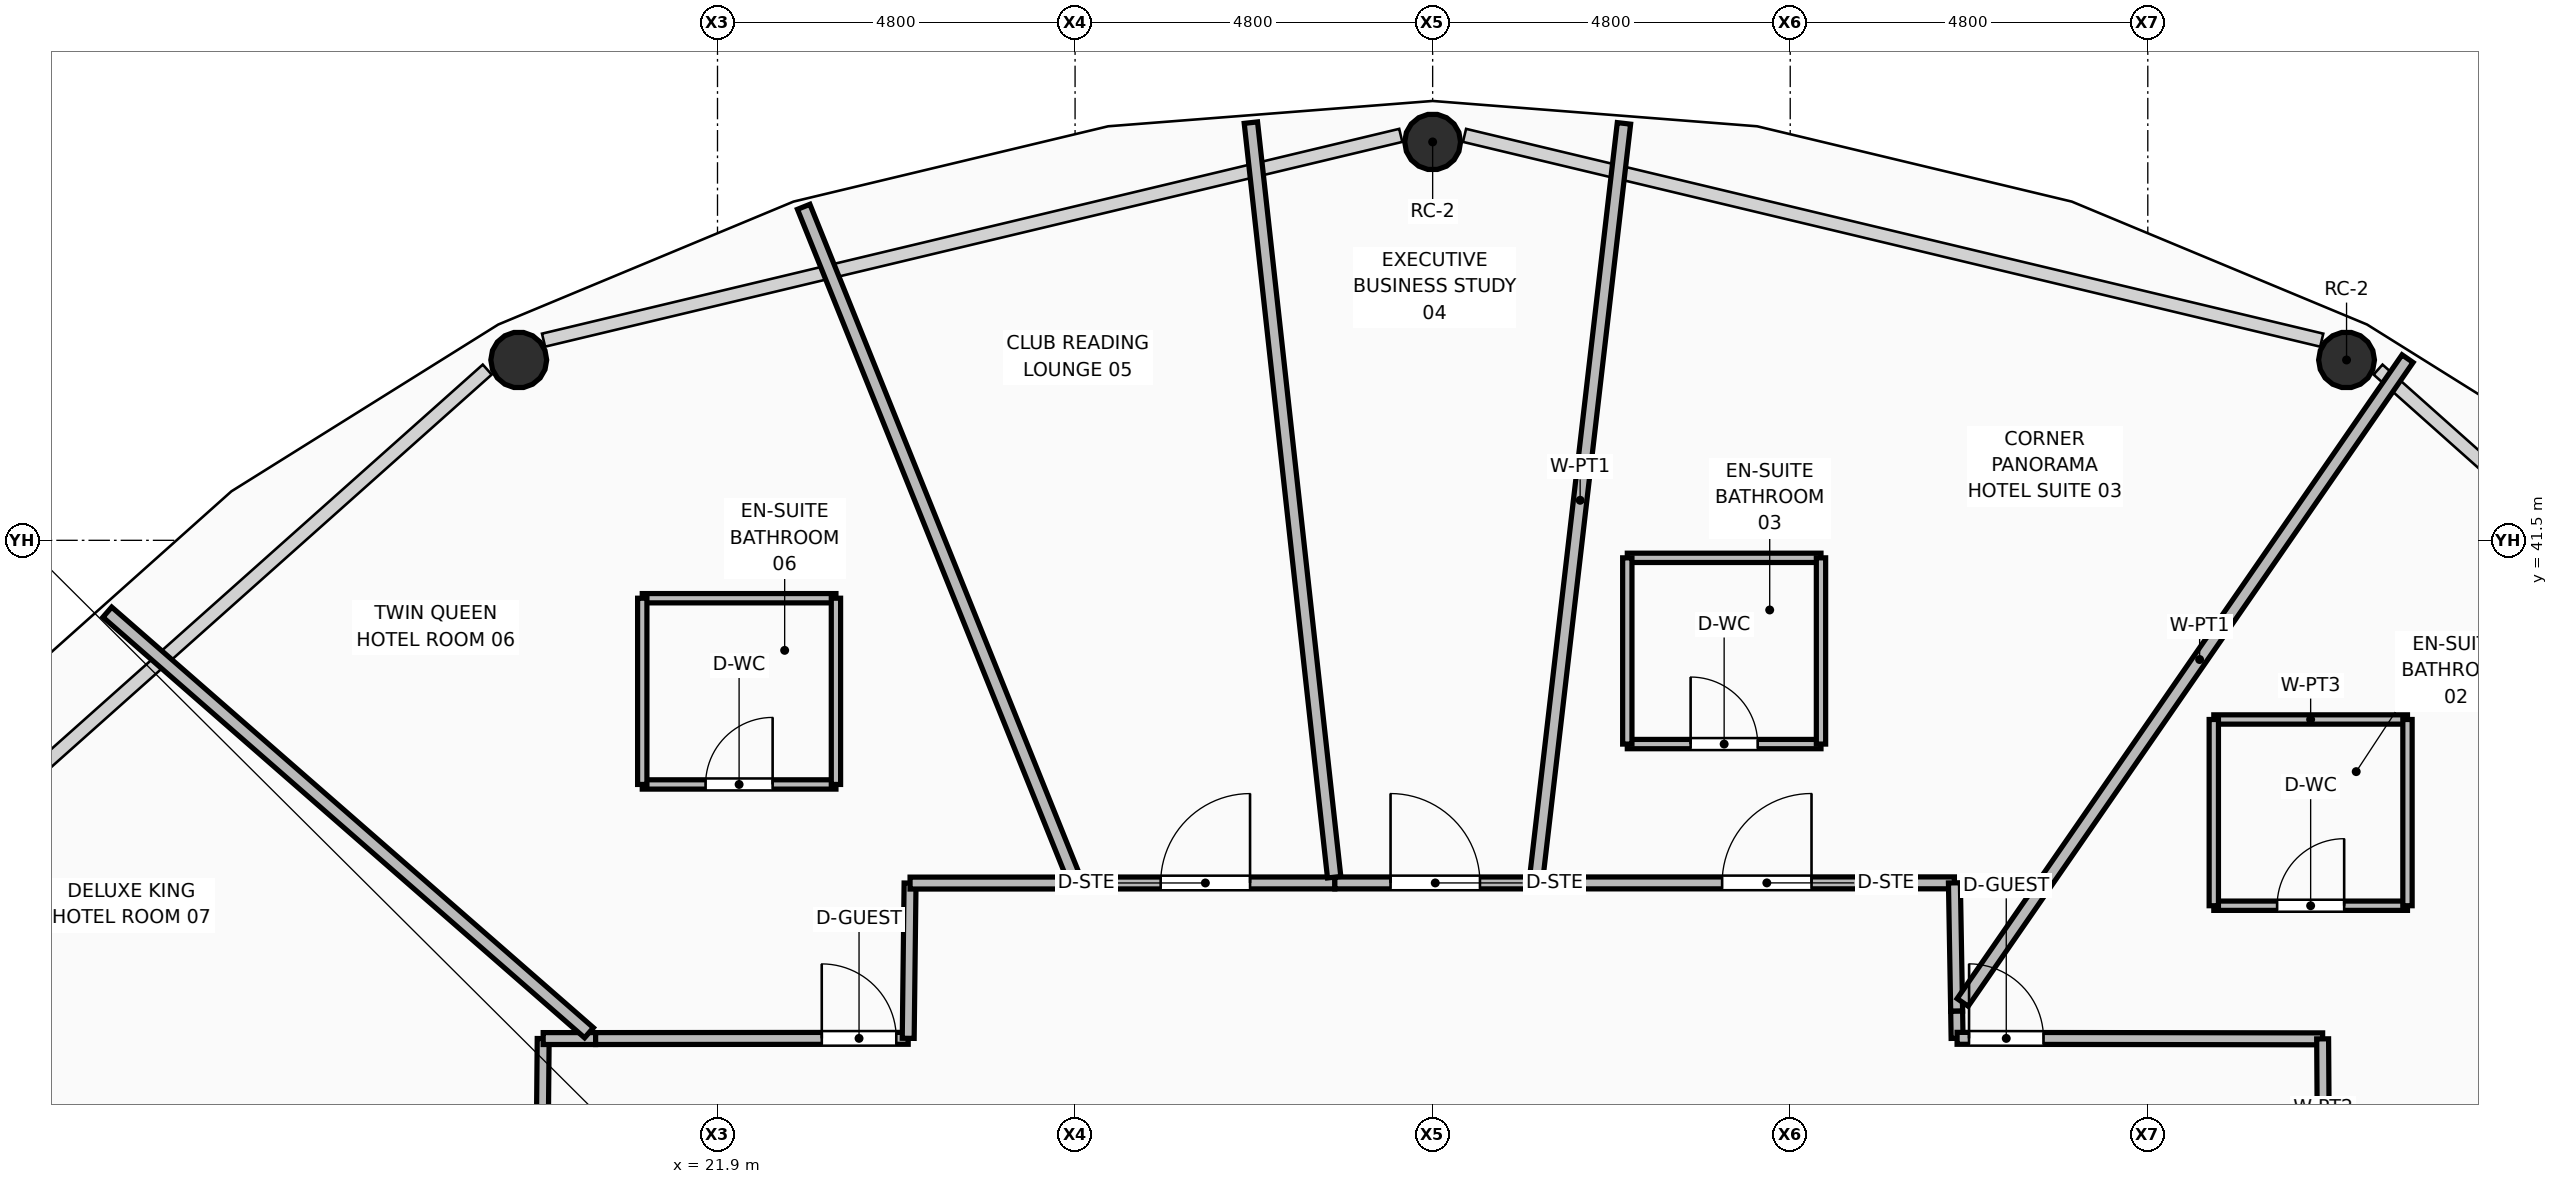
"""IFC4 building model, lengths in metres.
Left out: names, types, materials, properties, quantities, classifications, styles, units other than length and angle.
Written with IfcOpenShell. Run it as: python <this file> out.ifc"""

import sys

from ifc_helpers import new_model, si_unit, direction, frame, frame_2d, origin, origin_2d, place, context, subcontext, project, spatial, rectangle, hollow_circle, extrude, element, fill, save


model = new_model("IFC4")
c1 = context("Model", 3, precision=1e-05, world=origin(), true_north=direction((0.0, 1.0)))
c2 = subcontext(c1, "Body", "Model", "MODEL_VIEW")
j1 = project(units=[si_unit("LENGTHUNIT", "METRE"), si_unit("PLANEANGLEUNIT", "RADIAN")], contexts=[c1])
p1 = place(None, origin())
s1 = spatial("IfcSite", under=j1, at=p1, CompositionType="ELEMENT")
p2 = place(p1, origin())
s2 = spatial("IfcBuilding", under=s1, at=p2, CompositionType="ELEMENT")
p3 = place(p2, frame((0.0, 0.0, 172.2)))
s3 = spatial("IfcBuildingStorey", under=s2, at=p3, CompositionType="ELEMENT", Elevation=172.2)
p4 = place(p3, frame((43.768, 43.921, 0.0), z_axis=(-0.0265446917, -0.041036281919, 0.998804987427), x_axis=(0.839646641546, -0.543133056756, 0.0)))
e1 = element("IfcColumn", 1, at=p4, inside=s3, PredefinedType="COLUMN", context=c2, shape_type="SweptSolid", body=[
    extrude(hollow_circle(Radius=0.375, WallThickness=0.035, at=origin_2d()), origin(), (0.0, 0.0, 1.0), 3.504),
])
p5 = place(p3, frame((31.5, 46.848, 0.0), z_axis=(0.0, -0.047379765961, 0.998876948266), x_axis=(1.0, 0.0, 0.0)))
e2 = element("IfcColumn", 2, at=p5, inside=s3, PredefinedType="COLUMN", context=c2, shape_type="SweptSolid", body=[
    extrude(hollow_circle(Radius=0.375, WallThickness=0.035, at=origin_2d()), origin(), (0.0, 0.0, 1.0), 3.504),
])
p6 = place(p3, frame((19.232, 43.921, 0.0), z_axis=(0.0265446917, -0.041036281919, 0.998804987427), x_axis=(0.839646641546, 0.543133056756, 0.0)))
e3 = element("IfcColumn", 3, at=p6, inside=s3, PredefinedType="COLUMN", context=c2, shape_type="SweptSolid", body=[
    extrude(hollow_circle(Radius=0.375, WallThickness=0.035, at=origin_2d()), origin(), (0.0, 0.0, 1.0), 3.504),
])
p7 = place(p3, frame((19.535, 32.04, 0.0), z_axis=(0.0, 0.0, 1.0), x_axis=(0.009071319538, 0.999958854734, 0.0)))
e4 = element("IfcWall", 4, at=p7, inside=s3, PredefinedType="PARTITIONING", context=c2, shape_type="SweptSolid", body=[
    extrude(rectangle(XDim=2.772, YDim=0.16, at=frame_2d((1.386, 0.0))), origin(), (0.0, 0.0, 1.0), 2.936),
])
p8 = place(p3, frame((19.56, 34.812, 0.0), z_axis=(0.0, 0.0, 1.0), x_axis=(1.0, 0.0, 0.0)))
e5 = element("IfcWall", 5, at=p8, inside=s3, PredefinedType="PARTITIONING", context=c2, shape_type="SweptSolid", body=[
    extrude(rectangle(XDim=0.704, YDim=0.16, at=frame_2d((0.352, 0.0))), origin(), (0.0, 0.0, 1.0), 3.48),
])
p9 = place(p3, frame((20.264, 34.812, 0.0), z_axis=(0.0, 0.0, 1.0), x_axis=(0.999999756257, 0.000698201959, 0.0)))
e6 = element("IfcWall", 6, at=p9, inside=s3, PredefinedType="PARTITIONING", context=c2, shape_type="SweptSolid", body=[
    extrude(rectangle(XDim=4.196, YDim=0.16, at=frame_2d((2.098, 0.0))), origin(), (0.0, 0.0, 1.0), 2.936),
])
p10 = place(p9, frame((3.036, 0.0, 0.0)))
e7 = element("IfcOpeningElement", 7, at=p10, cuts=e6, PredefinedType="OPENING", context=c2, shape_type="SweptSolid", body=[
    extrude(rectangle(XDim=1.0, YDim=2.1, at=frame_2d((0.5, 1.05))), frame((0.0, 0.09, 0.0), z_axis=(0.0, -1.0, 0.0), x_axis=(1.0, 0.0, 0.0)), (0.0, 0.0, 1.0), 0.18),
])
p11 = place(p3, frame((24.46, 34.815, 0.0), z_axis=(0.0, 0.0, 1.0), x_axis=(0.012065663349, 0.999927207235, 0.0)))
e8 = element("IfcWall", 8, at=p11, inside=s3, PredefinedType="PARTITIONING", context=c2, shape_type="SweptSolid", body=[
    extrude(rectangle(XDim=2.084, YDim=0.16, at=frame_2d((1.042, 0.0))), origin(), (0.0, 0.0, 1.0), 3.48),
])
p12 = place(p3, frame((24.485, 36.899, 0.0), z_axis=(0.0, 0.0, 1.0), x_axis=(0.999999903669, 0.00043893335, 0.0)))
e9 = element("IfcWall", 9, at=p12, inside=s3, PredefinedType="PARTITIONING", context=c2, shape_type="SweptSolid", body=[
    extrude(rectangle(XDim=2.225, YDim=0.16, at=frame_2d((1.112, 0.0))), origin(), (0.0, 0.0, 1.0), 3.48),
])
p13 = place(p3, frame((26.71, 36.9, 0.0), z_axis=(0.0, 0.0, 1.0), x_axis=(0.999999960559, 0.000280859419, 0.0)))
e10 = element("IfcWall", 10, at=p13, inside=s3, PredefinedType="PARTITIONING", context=c2, shape_type="SweptSolid", body=[
    extrude(rectangle(XDim=3.477, YDim=0.16, at=frame_2d((1.739, 0.0))), origin(), (0.0, 0.0, 1.0), 3.48),
])
p14 = place(p13, frame((1.139, 0.0, 0.0)))
e11 = element("IfcOpeningElement", 11, at=p14, cuts=e10, PredefinedType="OPENING", context=c2, shape_type="SweptSolid", body=[
    extrude(rectangle(XDim=1.2, YDim=2.1, at=frame_2d((0.6, 1.05))), frame((0.0, 0.09, 0.0), z_axis=(0.0, -1.0, 0.0), x_axis=(1.0, 0.0, 0.0)), (0.0, 0.0, 1.0), 0.18),
])
p15 = place(p3, frame((30.187, 36.901, 0.0), z_axis=(0.0, 0.0, 1.0), x_axis=(1.0, 0.0, 0.0)))
e12 = element("IfcWall", 12, at=p15, inside=s3, PredefinedType="PARTITIONING", context=c2, shape_type="SweptSolid", body=[
    extrude(rectangle(XDim=2.696, YDim=0.16, at=frame_2d((1.348, 0.0))), origin(), (0.0, 0.0, 1.0), 2.936),
])
p16 = place(p15, frame((0.748, 0.0, 0.0)))
e13 = element("IfcOpeningElement", 13, at=p16, cuts=e12, PredefinedType="OPENING", context=c2, shape_type="SweptSolid", body=[
    extrude(rectangle(XDim=1.2, YDim=2.1, at=frame_2d((0.6, 1.05))), frame((0.0, 0.09, 0.0), z_axis=(0.0, -1.0, 0.0), x_axis=(1.0, 0.0, 0.0)), (0.0, 0.0, 1.0), 0.18),
])
p17 = place(p3, frame((32.883, 36.901, 0.0), z_axis=(0.0, 0.0, 1.0), x_axis=(0.999999976418, 0.000217174125, 0.0)))
e14 = element("IfcWall", 14, at=p17, inside=s3, PredefinedType="PARTITIONING", context=c2, shape_type="SweptSolid", body=[
    extrude(rectangle(XDim=5.621, YDim=0.16, at=frame_2d((2.811, 0.0))), origin(), (0.0, 0.0, 1.0), 3.48),
])
p18 = place(p17, frame((2.503, 0.0, 0.0)))
e15 = element("IfcOpeningElement", 15, at=p18, cuts=e14, PredefinedType="OPENING", context=c2, shape_type="SweptSolid", body=[
    extrude(rectangle(XDim=1.2, YDim=2.1, at=frame_2d((0.6, 1.05))), frame((0.0, 0.09, 0.0), z_axis=(0.0, -1.0, 0.0), x_axis=(1.0, 0.0, 0.0)), (0.0, 0.0, 1.0), 0.18),
])
p19 = place(p3, frame((38.504, 36.902, 0.0), z_axis=(0.0, 0.0, 1.0), x_axis=(0.017424387449, -0.999848183837, 0.0)))
e16 = element("IfcWall", 16, at=p19, inside=s3, PredefinedType="PARTITIONING", context=c2, shape_type="SweptSolid", body=[
    extrude(rectangle(XDim=1.723, YDim=0.16, at=frame_2d((0.862, 0.0))), origin(), (0.0, 0.0, 1.0), 3.48),
])
p20 = place(p3, frame((38.534, 35.179, 0.0), z_axis=(0.0, 0.0, 1.0), x_axis=(0.016764913799, -0.999859458957, 0.0)))
e17 = element("IfcWall", 17, at=p20, inside=s3, PredefinedType="PARTITIONING", context=c2, shape_type="SweptSolid", body=[
    extrude(rectangle(XDim=0.364, YDim=0.16, at=frame_2d((0.182, 0.0))), origin(), (0.0, 0.0, 1.0), 3.48),
])
p21 = place(p3, frame((38.54, 34.815, 0.0), z_axis=(0.0, 0.0, 1.0), x_axis=(0.999999029632, -0.001393102783, 0.0)))
e18 = element("IfcWall", 18, at=p21, inside=s3, PredefinedType="PARTITIONING", context=c2, shape_type="SweptSolid", body=[
    extrude(rectangle(XDim=4.907, YDim=0.16, at=frame_2d((2.454, 0.0))), origin(), (0.0, 0.0, 1.0), 2.936),
])
p22 = place(p21, frame((0.16, 0.0, 0.0)))
e19 = element("IfcOpeningElement", 19, at=p22, cuts=e18, PredefinedType="OPENING", context=c2, shape_type="SweptSolid", body=[
    extrude(rectangle(XDim=1.0, YDim=2.1, at=frame_2d((0.5, 1.05))), frame((0.0, 0.09, 0.0), z_axis=(0.0, -1.0, 0.0), x_axis=(1.0, 0.0, 0.0)), (0.0, 0.0, 1.0), 0.18),
])
p23 = place(p3, frame((43.447, 34.808, 0.0), z_axis=(0.0, 0.0, 1.0), x_axis=(0.006526585281, -0.999978701615, 0.0)))
e20 = element("IfcWall", 20, at=p23, inside=s3, PredefinedType="PARTITIONING", context=c2, shape_type="SweptSolid", body=[
    extrude(rectangle(XDim=2.768, YDim=0.16, at=frame_2d((1.384, 0.0))), origin(), (0.0, 0.0, 1.0), 2.936),
])
p24 = place(p3, frame((44.091, 32.115, 0.0), z_axis=(0.0, 0.0, 1.0), x_axis=(0.87061851124, 0.491958746122, 0.0)))
e21 = element("IfcWall", 21, at=p24, inside=s3, PredefinedType="PARTITIONING", context=c2, shape_type="SweptSolid", body=[
    extrude(rectangle(XDim=9.718, YDim=0.18, at=frame_2d((4.859, 0.0))), origin(), (0.0, 0.0, 1.0), 2.783),
])
p25 = place(p3, frame((38.615, 35.297, 0.0), z_axis=(0.0, 0.0, 1.0), x_axis=(0.568508810202, 0.822677174062, 0.0)))
e22 = element("IfcWall", 22, at=p25, inside=s3, PredefinedType="PARTITIONING", context=c2, shape_type="SweptSolid", body=[
    extrude(rectangle(XDim=10.505, YDim=0.18, at=frame_2d((5.252, 0.0))), origin(), (0.0, 0.0, 1.0), 2.783),
])
p26 = place(p3, frame((32.892, 36.978, 0.0), z_axis=(0.0, 0.0, 1.0), x_axis=(0.115443667248, 0.99331402874, 0.0)))
e23 = element("IfcWall", 23, at=p26, inside=s3, PredefinedType="PARTITIONING", context=c2, shape_type="SweptSolid", body=[
    extrude(rectangle(XDim=10.187, YDim=0.18, at=frame_2d((5.094, 0.0))), origin(), (0.0, 0.0, 1.0), 2.783),
])
p27 = place(p3, frame((30.178, 36.978, 0.0), z_axis=(0.0, 0.0, 1.0), x_axis=(-0.109703118526, 0.993964398651, 0.0)))
e24 = element("IfcWall", 24, at=p27, inside=s3, PredefinedType="PARTITIONING", context=c2, shape_type="SweptSolid", body=[
    extrude(rectangle(XDim=10.19, YDim=0.18, at=frame_2d((5.095, 0.0))), origin(), (0.0, 0.0, 1.0), 2.783),
])
p28 = place(p3, frame((26.679, 36.978, 0.0), z_axis=(0.0, 0.0, 1.0), x_axis=(-0.3733858657, 0.927676126294, 0.0)))
e25 = element("IfcWall", 25, at=p28, inside=s3, PredefinedType="PARTITIONING", context=c2, shape_type="SweptSolid", body=[
    extrude(rectangle(XDim=9.701, YDim=0.18, at=frame_2d((4.85, 0.0))), origin(), (0.0, 0.0, 1.0), 2.783),
])
p29 = place(p3, frame((20.175, 34.89, 0.0), z_axis=(0.0, 0.0, 1.0), x_axis=(-0.753258118622, 0.657725023646, 0.0)))
e26 = element("IfcWall", 26, at=p29, inside=s3, PredefinedType="PARTITIONING", context=c2, shape_type="SweptSolid", body=[
    extrude(rectangle(XDim=8.584, YDim=0.18, at=frame_2d((4.292, 0.0))), origin(), (0.0, 0.0, 1.0), 2.783),
])
p30 = place(p3, frame((41.986, 36.595, 0.0), z_axis=(0.0, 0.0, 1.0), x_axis=(1.0, 0.0, 0.0)))
e27 = element("IfcWall", 27, at=p30, inside=s3, PredefinedType="PARTITIONING", context=c2, shape_type="SweptSolid", body=[
    extrude(rectangle(XDim=2.6, YDim=0.125, at=frame_2d((1.3, 0.0))), origin(), (0.0, 0.0, 1.0), 2.936),
])
p31 = place(p30, frame((0.85, 0.0, 0.0)))
e28 = element("IfcOpeningElement", 28, at=p31, cuts=e27, PredefinedType="OPENING", context=c2, shape_type="SweptSolid", body=[
    extrude(rectangle(XDim=0.9, YDim=2.1, at=frame_2d((0.45, 1.05))), frame((0.0, 0.073, 0.0), z_axis=(0.0, -1.0, 0.0), x_axis=(1.0, 0.0, 0.0)), (0.0, 0.0, 1.0), 0.145),
])
p32 = place(p3, frame((41.986, 39.095, 0.0), z_axis=(0.0, 0.0, 1.0), x_axis=(1.0, 0.0, 0.0)))
e29 = element("IfcWall", 29, at=p32, inside=s3, PredefinedType="PARTITIONING", context=c2, shape_type="SweptSolid", body=[
    extrude(rectangle(XDim=2.6, YDim=0.125, at=frame_2d((1.3, 0.0))), origin(), (0.0, 0.0, 1.0), 2.936),
])
p33 = place(p3, frame((41.986, 36.595, 0.0), z_axis=(0.0, 0.0, 1.0), x_axis=(0.0, 1.0, 0.0)))
e30 = element("IfcWall", 30, at=p33, inside=s3, PredefinedType="PARTITIONING", context=c2, shape_type="SweptSolid", body=[
    extrude(rectangle(XDim=2.5, YDim=0.125, at=frame_2d((1.25, 0.0))), origin(), (0.0, 0.0, 1.0), 2.936),
])
p34 = place(p3, frame((44.586, 36.595, 0.0), z_axis=(0.0, 0.0, 1.0), x_axis=(0.0, 1.0, 0.0)))
e31 = element("IfcWall", 31, at=p34, inside=s3, PredefinedType="PARTITIONING", context=c2, shape_type="SweptSolid", body=[
    extrude(rectangle(XDim=2.5, YDim=0.125, at=frame_2d((1.25, 0.0))), origin(), (0.0, 0.0, 1.0), 3.48),
])
p35 = place(p3, frame((34.113, 38.765, 0.0), z_axis=(0.0, 0.0, 1.0), x_axis=(1.0, 0.0, 0.0)))
e32 = element("IfcWall", 32, at=p35, inside=s3, PredefinedType="PARTITIONING", context=c2, shape_type="SweptSolid", body=[
    extrude(rectangle(XDim=2.6, YDim=0.125, at=frame_2d((1.3, 0.0))), origin(), (0.0, 0.0, 1.0), 3.48),
])
p36 = place(p35, frame((0.85, 0.0, 0.0)))
e33 = element("IfcOpeningElement", 33, at=p36, cuts=e32, PredefinedType="OPENING", context=c2, shape_type="SweptSolid", body=[
    extrude(rectangle(XDim=0.9, YDim=2.1, at=frame_2d((0.45, 1.05))), frame((0.0, 0.073, 0.0), z_axis=(0.0, -1.0, 0.0), x_axis=(1.0, 0.0, 0.0)), (0.0, 0.0, 1.0), 0.145),
])
p37 = place(p3, frame((34.113, 41.265, 0.0), z_axis=(0.0, 0.0, 1.0), x_axis=(1.0, 0.0, 0.0)))
e34 = element("IfcWall", 34, at=p37, inside=s3, PredefinedType="PARTITIONING", context=c2, shape_type="SweptSolid", body=[
    extrude(rectangle(XDim=2.6, YDim=0.125, at=frame_2d((1.3, 0.0))), origin(), (0.0, 0.0, 1.0), 3.48),
])
for number, where, z_axis, x_axis in (
    (35, (34.113, 38.765, 0.0), (0.0, 0.0, 1.0), (0.0, 1.0, 0.0)),
    (36, (36.713, 38.765, 0.0), (0.0, 0.0, 1.0), (0.0, 1.0, 0.0)),
):
    element("IfcWall", number, at=place(p3, frame(where, z_axis=z_axis, x_axis=x_axis)), inside=s3, PredefinedType="PARTITIONING", context=c2, shape_type="SweptSolid", body=[
        extrude(rectangle(XDim=2.5, YDim=0.125, at=frame_2d((1.25, 0.0))), origin(), (0.0, 0.0, 1.0), 3.48),
    ])
p38 = place(p3, frame((20.89, 38.223, 0.0), z_axis=(0.0, 0.0, 1.0), x_axis=(1.0, 0.0, 0.0)))
e37 = element("IfcWall", 37, at=p38, inside=s3, PredefinedType="PARTITIONING", context=c2, shape_type="SweptSolid", body=[
    extrude(rectangle(XDim=2.6, YDim=0.125, at=frame_2d((1.3, 0.0))), origin(), (0.0, 0.0, 1.0), 3.48),
])
p39 = place(p38, frame((0.85, 0.0, 0.0)))
e38 = element("IfcOpeningElement", 38, at=p39, cuts=e37, PredefinedType="OPENING", context=c2, shape_type="SweptSolid", body=[
    extrude(rectangle(XDim=0.9, YDim=2.1, at=frame_2d((0.45, 1.05))), frame((0.0, 0.073, 0.0), z_axis=(0.0, -1.0, 0.0), x_axis=(1.0, 0.0, 0.0)), (0.0, 0.0, 1.0), 0.145),
])
p40 = place(p3, frame((20.89, 40.723, 0.0), z_axis=(0.0, 0.0, 1.0), x_axis=(1.0, 0.0, 0.0)))
e39 = element("IfcWall", 39, at=p40, inside=s3, PredefinedType="PARTITIONING", context=c2, shape_type="SweptSolid", body=[
    extrude(rectangle(XDim=2.6, YDim=0.125, at=frame_2d((1.3, 0.0))), origin(), (0.0, 0.0, 1.0), 3.48),
])
p41 = place(p3, frame((20.89, 38.223, 0.0), z_axis=(0.0, 0.0, 1.0), x_axis=(0.0, 1.0, 0.0)))
e40 = element("IfcWall", 40, at=p41, inside=s3, PredefinedType="PARTITIONING", context=c2, shape_type="SweptSolid", body=[
    extrude(rectangle(XDim=2.5, YDim=0.125, at=frame_2d((1.25, 0.0))), origin(), (0.0, 0.0, 1.0), 2.936),
])
p42 = place(p3, frame((23.49, 38.223, 0.0), z_axis=(0.0, 0.0, 1.0), x_axis=(0.0, 1.0, 0.0)))
e41 = element("IfcWall", 41, at=p42, inside=s3, PredefinedType="PARTITIONING", context=c2, shape_type="SweptSolid", body=[
    extrude(rectangle(XDim=2.5, YDim=0.125, at=frame_2d((1.25, 0.0))), origin(), (0.0, 0.0, 1.0), 3.48),
])
p43 = place(p31, origin())
e42 = element("IfcDoor", 42, at=p43, inside=s3, OperationType="SINGLE_SWING_RIGHT", PredefinedType="DOOR", context=c2, shape_type="SweptSolid", body=[
    extrude(rectangle(XDim=0.9, YDim=2.1, at=frame_2d((0.45, 1.05))), frame((0.0, 0.025, 0.0), z_axis=(0.0, -1.0, 0.0), x_axis=(1.0, 0.0, 0.0)), (0.0, 0.0, 1.0), 0.05),
])
fill(e28, e42)
p44 = place(p22, origin())
e43 = element("IfcDoor", 43, at=p44, inside=s3, OperationType="SINGLE_SWING_LEFT", PredefinedType="DOOR", context=c2, shape_type="SweptSolid", body=[
    extrude(rectangle(XDim=1.0, YDim=2.1, at=frame_2d((0.5, 1.05))), frame((0.0, 0.025, 0.0), z_axis=(0.0, -1.0, 0.0), x_axis=(1.0, 0.0, 0.0)), (0.0, 0.0, 1.0), 0.05),
])
fill(e19, e43)
p45 = place(p36, origin())
e44 = element("IfcDoor", 44, at=p45, inside=s3, OperationType="SINGLE_SWING_LEFT", PredefinedType="DOOR", context=c2, shape_type="SweptSolid", body=[
    extrude(rectangle(XDim=0.9, YDim=2.1, at=frame_2d((0.45, 1.05))), frame((0.0, 0.025, 0.0), z_axis=(0.0, -1.0, 0.0), x_axis=(1.0, 0.0, 0.0)), (0.0, 0.0, 1.0), 0.05),
])
fill(e33, e44)
p46 = place(p18, origin())
e45 = element("IfcDoor", 45, at=p46, inside=s3, OperationType="SINGLE_SWING_RIGHT", PredefinedType="DOOR", context=c2, shape_type="SweptSolid", body=[
    extrude(rectangle(XDim=1.2, YDim=2.1, at=frame_2d((0.6, 1.05))), frame((0.0, 0.025, 0.0), z_axis=(0.0, -1.0, 0.0), x_axis=(1.0, 0.0, 0.0)), (0.0, 0.0, 1.0), 0.05),
])
fill(e15, e45)
p47 = place(p16, origin())
e46 = element("IfcDoor", 46, at=p47, inside=s3, OperationType="SINGLE_SWING_LEFT", PredefinedType="DOOR", context=c2, shape_type="SweptSolid", body=[
    extrude(rectangle(XDim=1.2, YDim=2.1, at=frame_2d((0.6, 1.05))), frame((0.0, 0.025, 0.0), z_axis=(0.0, -1.0, 0.0), x_axis=(1.0, 0.0, 0.0)), (0.0, 0.0, 1.0), 0.05),
])
fill(e13, e46)
p48 = place(p14, origin())
e47 = element("IfcDoor", 47, at=p48, inside=s3, OperationType="SINGLE_SWING_RIGHT", PredefinedType="DOOR", context=c2, shape_type="SweptSolid", body=[
    extrude(rectangle(XDim=1.2, YDim=2.1, at=frame_2d((0.6, 1.05))), frame((0.0, 0.025, 0.0), z_axis=(0.0, -1.0, 0.0), x_axis=(1.0, 0.0, 0.0)), (0.0, 0.0, 1.0), 0.05),
])
fill(e11, e47)
p49 = place(p39, origin())
e48 = element("IfcDoor", 48, at=p49, inside=s3, OperationType="SINGLE_SWING_RIGHT", PredefinedType="DOOR", context=c2, shape_type="SweptSolid", body=[
    extrude(rectangle(XDim=0.9, YDim=2.1, at=frame_2d((0.45, 1.05))), frame((0.0, 0.025, 0.0), z_axis=(0.0, -1.0, 0.0), x_axis=(1.0, 0.0, 0.0)), (0.0, 0.0, 1.0), 0.05),
])
fill(e38, e48)
p50 = place(p10, origin())
e49 = element("IfcDoor", 49, at=p50, inside=s3, OperationType="SINGLE_SWING_LEFT", PredefinedType="DOOR", context=c2, shape_type="SweptSolid", body=[
    extrude(rectangle(XDim=1.0, YDim=2.1, at=frame_2d((0.5, 1.05))), frame((0.0, 0.025, 0.0), z_axis=(0.0, -1.0, 0.0), x_axis=(1.0, 0.0, 0.0)), (0.0, 0.0, 1.0), 0.05),
])
fill(e7, e49)
save(model, sys.argv[1])
